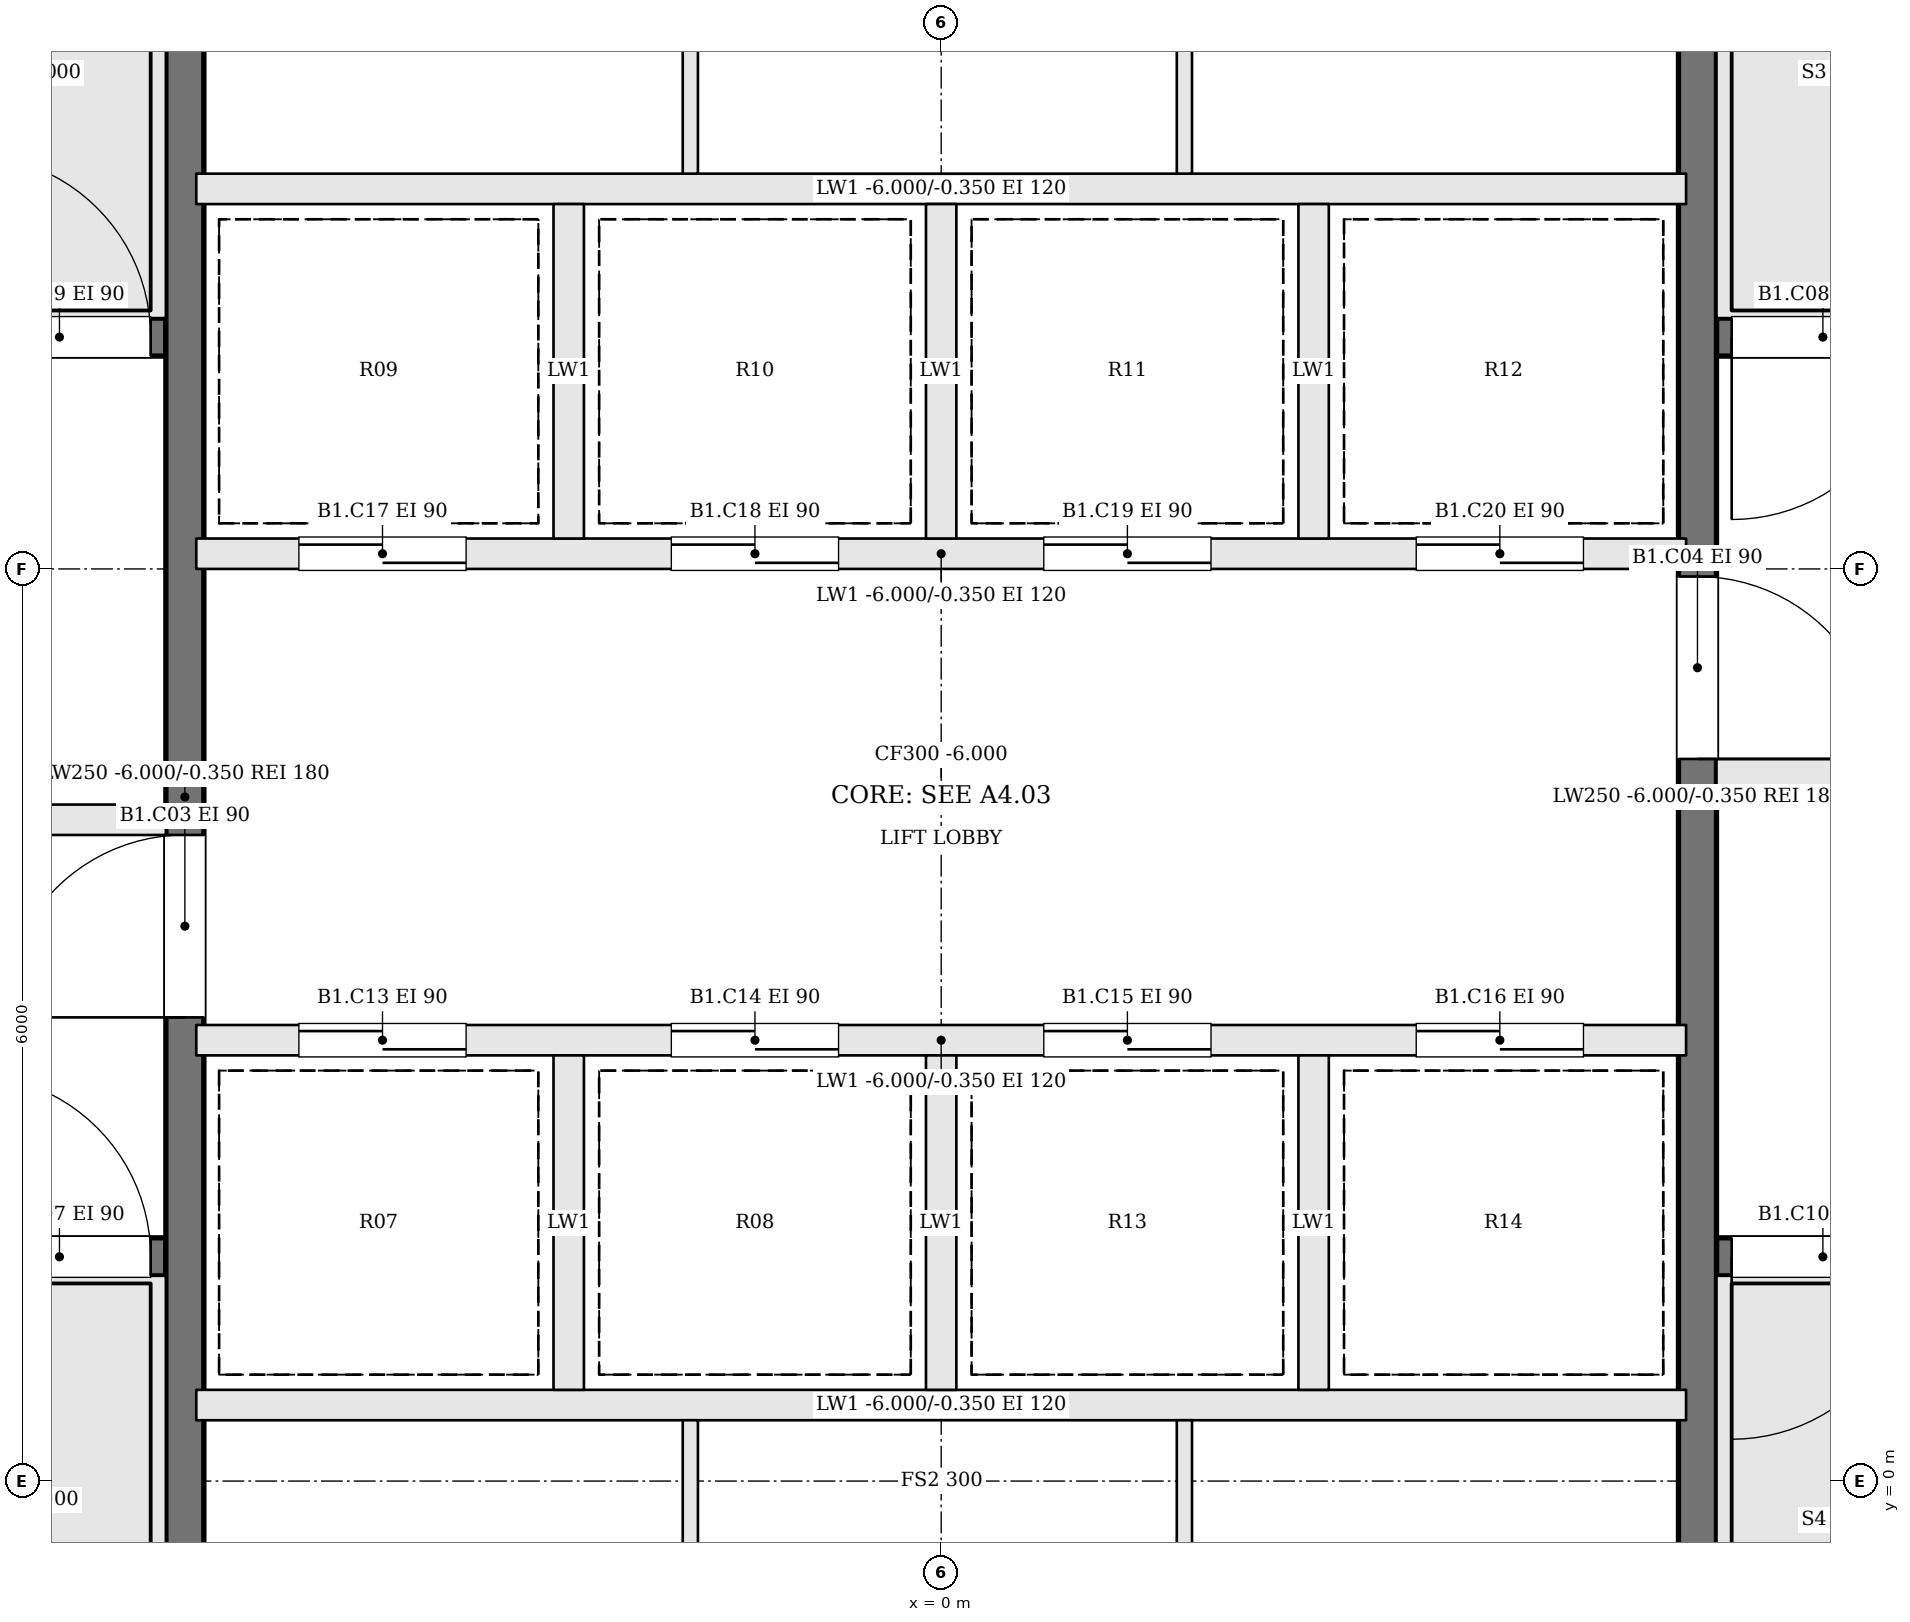
"""IFC4 building model, lengths in metres.
Left out: names, types, materials, properties, quantities, classifications, styles, units other than length and angle.
Written with IfcOpenShell. Run it as: python <this file> out.ifc"""

import sys

from ifc_helpers import new_model, si_unit, direction, frame, frame_2d, origin, place, context, subcontext, project, spatial, rectangle, extrude, element, fill, save


model = new_model("IFC4")
c1 = context("Model", 3, precision=1e-05, world=origin(), true_north=direction((0.0, 1.0)))
c2 = subcontext(c1, "Body", "Model", "MODEL_VIEW")
j1 = project(units=[si_unit("LENGTHUNIT", "METRE"), si_unit("PLANEANGLEUNIT", "RADIAN")], contexts=[c1])
p1 = place(None, origin())
s1 = spatial("IfcSite", under=j1, at=p1, CompositionType="ELEMENT")
p2 = place(p1, origin())
s2 = spatial("IfcBuilding", under=s1, at=p2, CompositionType="ELEMENT")
p3 = place(p2, frame((0.0, 0.0, -6.0)))
s3 = spatial("IfcBuildingStorey", under=s2, at=p3, CompositionType="ELEMENT", Elevation=-6.0)
p4 = place(p3, frame((-11.6, 1.475, 0.0), z_axis=(0.0, 0.0, 1.0), x_axis=(1.0, 0.0, 0.0)))
e1 = element("IfcWall", 1, at=p4, inside=s3, PredefinedType="SOLIDWALL", context=c2, shape_type="SweptSolid", body=[
    extrude(rectangle(XDim=6.5, YDim=0.25, at=frame_2d((3.25, 0.0))), origin(), (0.0, 0.0, 1.0), 5.65),
])
p5 = place(p4, frame((5.2, 0.0, 0.0)))
e2 = element("IfcOpeningElement", 2, at=p5, cuts=e1, PredefinedType="OPENING", context=c2, shape_type="SweptSolid", body=[
    extrude(rectangle(XDim=1.2, YDim=2.1, at=frame_2d((0.6, 1.05))), frame((0.0, 0.135, 0.0), z_axis=(0.0, -1.0, 0.0), x_axis=(1.0, 0.0, 0.0)), (0.0, 0.0, 1.0), 0.27),
])
p6 = place(p3, frame((11.6, 7.525, 0.0), z_axis=(0.0, 0.0, 1.0), x_axis=(-1.0, 0.0, 0.0)))
e3 = element("IfcWall", 3, at=p6, inside=s3, PredefinedType="SOLIDWALL", context=c2, shape_type="SweptSolid", body=[
    extrude(rectangle(XDim=6.5, YDim=0.25, at=frame_2d((3.25, 0.0))), origin(), (0.0, 0.0, 1.0), 5.65),
])
p7 = place(p6, frame((5.2, 0.0, 0.0)))
e4 = element("IfcOpeningElement", 4, at=p7, cuts=e3, PredefinedType="OPENING", context=c2, shape_type="SweptSolid", body=[
    extrude(rectangle(XDim=1.2, YDim=2.1, at=frame_2d((0.6, 1.05))), frame((0.0, 0.135, 0.0), z_axis=(0.0, -1.0, 0.0), x_axis=(1.0, 0.0, 0.0)), (0.0, 0.0, 1.0), 0.27),
])
p8 = place(p3, frame((-11.6, 4.35, 0.0), z_axis=(0.0, 0.0, 1.0), x_axis=(1.0, 0.0, 0.0)))
e5 = element("IfcWall", 5, at=p8, inside=s3, PredefinedType="SOLIDWALL", context=c2, shape_type="SweptSolid", body=[
    extrude(rectangle(XDim=6.5, YDim=0.2, at=frame_2d((3.25, 0.0))), origin(), (0.0, 0.0, 1.0), 5.65),
])
p9 = place(p8, frame((3.8, 0.0, 0.0)))
e6 = element("IfcOpeningElement", 6, at=p9, cuts=e5, PredefinedType="OPENING", context=c2, shape_type="SweptSolid", body=[
    extrude(rectangle(XDim=1.2, YDim=2.1, at=frame_2d((0.6, 1.05))), frame((0.0, 0.11, 0.0), z_axis=(0.0, -1.0, 0.0), x_axis=(1.0, 0.0, 0.0)), (0.0, 0.0, 1.0), 0.22),
])
p10 = place(p8, frame((0.5, 0.0, 0.0)))
e7 = element("IfcOpeningElement", 7, at=p10, cuts=e5, PredefinedType="OPENING", context=c2, shape_type="SweptSolid", body=[
    extrude(rectangle(XDim=1.2, YDim=2.1, at=frame_2d((0.6, 1.05))), frame((0.0, 0.11, 0.0), z_axis=(0.0, -1.0, 0.0), x_axis=(1.0, 0.0, 0.0)), (0.0, 0.0, 1.0), 0.22),
])
p11 = place(p3, frame((11.6, 4.65, 0.0), z_axis=(0.0, 0.0, 1.0), x_axis=(-1.0, 0.0, 0.0)))
e8 = element("IfcWall", 8, at=p11, inside=s3, PredefinedType="SOLIDWALL", context=c2, shape_type="SweptSolid", body=[
    extrude(rectangle(XDim=6.5, YDim=0.2, at=frame_2d((3.25, 0.0))), origin(), (0.0, 0.0, 1.0), 5.65),
])
p12 = place(p11, frame((3.8, 0.0, 0.0)))
e9 = element("IfcOpeningElement", 9, at=p12, cuts=e8, PredefinedType="OPENING", context=c2, shape_type="SweptSolid", body=[
    extrude(rectangle(XDim=1.2, YDim=2.1, at=frame_2d((0.6, 1.05))), frame((0.0, 0.11, 0.0), z_axis=(0.0, -1.0, 0.0), x_axis=(1.0, 0.0, 0.0)), (0.0, 0.0, 1.0), 0.22),
])
p13 = place(p11, frame((0.5, 0.0, 0.0)))
e10 = element("IfcOpeningElement", 10, at=p13, cuts=e8, PredefinedType="OPENING", context=c2, shape_type="SweptSolid", body=[
    extrude(rectangle(XDim=1.2, YDim=2.1, at=frame_2d((0.6, 1.05))), frame((0.0, 0.11, 0.0), z_axis=(0.0, -1.0, 0.0), x_axis=(1.0, 0.0, 0.0)), (0.0, 0.0, 1.0), 0.22),
])
p14 = place(p3, frame((-11.6, 7.525, 0.0), z_axis=(0.0, 0.0, 1.0), x_axis=(1.0, 0.0, 0.0)))
e11 = element("IfcWall", 11, at=p14, inside=s3, PredefinedType="SOLIDWALL", context=c2, shape_type="SweptSolid", body=[
    extrude(rectangle(XDim=6.5, YDim=0.25, at=frame_2d((3.25, 0.0))), origin(), (0.0, 0.0, 1.0), 5.65),
])
p15 = place(p14, frame((5.2, 0.0, 0.0)))
e12 = element("IfcOpeningElement", 12, at=p15, cuts=e11, PredefinedType="OPENING", context=c2, shape_type="SweptSolid", body=[
    extrude(rectangle(XDim=1.2, YDim=2.1, at=frame_2d((0.6, 1.05))), frame((0.0, 0.135, 0.0), z_axis=(0.0, -1.0, 0.0), x_axis=(1.0, 0.0, 0.0)), (0.0, 0.0, 1.0), 0.27),
])
p16 = place(p3, frame((11.6, 1.475, 0.0), z_axis=(0.0, 0.0, 1.0), x_axis=(-1.0, 0.0, 0.0)))
e13 = element("IfcWall", 13, at=p16, inside=s3, PredefinedType="SOLIDWALL", context=c2, shape_type="SweptSolid", body=[
    extrude(rectangle(XDim=6.5, YDim=0.25, at=frame_2d((3.25, 0.0))), origin(), (0.0, 0.0, 1.0), 5.65),
])
p17 = place(p16, frame((5.2, 0.0, 0.0)))
e14 = element("IfcOpeningElement", 14, at=p17, cuts=e13, PredefinedType="OPENING", context=c2, shape_type="SweptSolid", body=[
    extrude(rectangle(XDim=1.2, YDim=2.1, at=frame_2d((0.6, 1.05))), frame((0.0, 0.135, 0.0), z_axis=(0.0, -1.0, 0.0), x_axis=(1.0, 0.0, 0.0)), (0.0, 0.0, 1.0), 0.27),
])
p18 = place(p3, frame((-4.975, -1.6, 0.0), z_axis=(0.0, 0.0, 1.0), x_axis=(0.0, 1.0, 0.0)))
e15 = element("IfcWall", 15, at=p18, inside=s3, PredefinedType="SOLIDWALL", context=c2, shape_type="SweptSolid", body=[
    extrude(rectangle(XDim=12.2, YDim=0.25, at=frame_2d((6.1, 0.0))), origin(), (0.0, 0.0, 1.0), 5.65),
])
p19 = place(p18, frame((4.65, 0.0, 0.0)))
e16 = element("IfcOpeningElement", 16, at=p19, cuts=e15, PredefinedType="OPENING", context=c2, shape_type="SweptSolid", body=[
    extrude(rectangle(XDim=1.2, YDim=2.1, at=frame_2d((0.6, 1.05))), frame((0.0, 0.135, 0.0), z_axis=(0.0, -1.0, 0.0), x_axis=(1.0, 0.0, 0.0)), (0.0, 0.0, 1.0), 0.27),
])
p20 = place(p3, frame((4.975, 10.6, 0.0), z_axis=(0.0, 0.0, 1.0), x_axis=(0.0, -1.0, 0.0)))
e17 = element("IfcWall", 17, at=p20, inside=s3, PredefinedType="SOLIDWALL", context=c2, shape_type="SweptSolid", body=[
    extrude(rectangle(XDim=12.2, YDim=0.25, at=frame_2d((6.1, 0.0))), origin(), (0.0, 0.0, 1.0), 5.65),
])
p21 = place(p20, frame((4.65, 0.0, 0.0)))
e18 = element("IfcOpeningElement", 18, at=p21, cuts=e17, PredefinedType="OPENING", context=c2, shape_type="SweptSolid", body=[
    extrude(rectangle(XDim=1.2, YDim=2.1, at=frame_2d((0.6, 1.05))), frame((0.0, 0.135, 0.0), z_axis=(0.0, -1.0, 0.0), x_axis=(1.0, 0.0, 0.0)), (0.0, 0.0, 1.0), 0.27),
])
p22 = place(p3, frame((-4.9, 0.5, 0.0), z_axis=(0.0, 0.0, 1.0), x_axis=(1.0, 0.0, 0.0)))
e19 = element("IfcWall", 19, at=p22, inside=s3, PredefinedType="SOLIDWALL", context=c2, shape_type="SweptSolid", body=[
    extrude(rectangle(XDim=9.8, YDim=0.2, at=frame_2d((4.9, 0.0))), origin(), (0.0, 0.0, 1.0), 5.65),
])
p23 = place(p3, frame((-4.9, 2.9, 0.0), z_axis=(0.0, 0.0, 1.0), x_axis=(1.0, 0.0, 0.0)))
e20 = element("IfcWall", 20, at=p23, inside=s3, PredefinedType="SOLIDWALL", context=c2, shape_type="SweptSolid", body=[
    extrude(rectangle(XDim=9.8, YDim=0.2, at=frame_2d((4.9, 0.0))), origin(), (0.0, 0.0, 1.0), 5.65),
])
p24 = place(p23, frame((0.675, 0.0, 0.0)))
e21 = element("IfcOpeningElement", 21, at=p24, cuts=e20, PredefinedType="OPENING", context=c2, shape_type="SweptSolid", body=[
    extrude(rectangle(XDim=1.1, YDim=2.1, at=frame_2d((0.55, 1.05))), frame((0.0, 0.11, 0.0), z_axis=(0.0, -1.0, 0.0), x_axis=(1.0, 0.0, 0.0)), (0.0, 0.0, 1.0), 0.22),
])
p25 = place(p23, frame((3.125, 0.0, 0.0)))
e22 = element("IfcOpeningElement", 22, at=p25, cuts=e20, PredefinedType="OPENING", context=c2, shape_type="SweptSolid", body=[
    extrude(rectangle(XDim=1.1, YDim=2.1, at=frame_2d((0.55, 1.05))), frame((0.0, 0.11, 0.0), z_axis=(0.0, -1.0, 0.0), x_axis=(1.0, 0.0, 0.0)), (0.0, 0.0, 1.0), 0.22),
])
p26 = place(p23, frame((5.575, 0.0, 0.0)))
e23 = element("IfcOpeningElement", 23, at=p26, cuts=e20, PredefinedType="OPENING", context=c2, shape_type="SweptSolid", body=[
    extrude(rectangle(XDim=1.1, YDim=2.1, at=frame_2d((0.55, 1.05))), frame((0.0, 0.11, 0.0), z_axis=(0.0, -1.0, 0.0), x_axis=(1.0, 0.0, 0.0)), (0.0, 0.0, 1.0), 0.22),
])
p27 = place(p23, frame((8.025, 0.0, 0.0)))
e24 = element("IfcOpeningElement", 24, at=p27, cuts=e20, PredefinedType="OPENING", context=c2, shape_type="SweptSolid", body=[
    extrude(rectangle(XDim=1.1, YDim=2.1, at=frame_2d((0.55, 1.05))), frame((0.0, 0.11, 0.0), z_axis=(0.0, -1.0, 0.0), x_axis=(1.0, 0.0, 0.0)), (0.0, 0.0, 1.0), 0.22),
])
p28 = place(p3, frame((-4.9, 6.1, 0.0), z_axis=(0.0, 0.0, 1.0), x_axis=(1.0, 0.0, 0.0)))
e25 = element("IfcWall", 25, at=p28, inside=s3, PredefinedType="SOLIDWALL", context=c2, shape_type="SweptSolid", body=[
    extrude(rectangle(XDim=9.8, YDim=0.2, at=frame_2d((4.9, 0.0))), origin(), (0.0, 0.0, 1.0), 5.65),
])
p29 = place(p28, frame((0.675, 0.0, 0.0)))
e26 = element("IfcOpeningElement", 26, at=p29, cuts=e25, PredefinedType="OPENING", context=c2, shape_type="SweptSolid", body=[
    extrude(rectangle(XDim=1.1, YDim=2.1, at=frame_2d((0.55, 1.05))), frame((0.0, 0.11, 0.0), z_axis=(0.0, -1.0, 0.0), x_axis=(1.0, 0.0, 0.0)), (0.0, 0.0, 1.0), 0.22),
])
p30 = place(p28, frame((3.125, 0.0, 0.0)))
e27 = element("IfcOpeningElement", 27, at=p30, cuts=e25, PredefinedType="OPENING", context=c2, shape_type="SweptSolid", body=[
    extrude(rectangle(XDim=1.1, YDim=2.1, at=frame_2d((0.55, 1.05))), frame((0.0, 0.11, 0.0), z_axis=(0.0, -1.0, 0.0), x_axis=(1.0, 0.0, 0.0)), (0.0, 0.0, 1.0), 0.22),
])
p31 = place(p28, frame((5.575, 0.0, 0.0)))
e28 = element("IfcOpeningElement", 28, at=p31, cuts=e25, PredefinedType="OPENING", context=c2, shape_type="SweptSolid", body=[
    extrude(rectangle(XDim=1.1, YDim=2.1, at=frame_2d((0.55, 1.05))), frame((0.0, 0.11, 0.0), z_axis=(0.0, -1.0, 0.0), x_axis=(1.0, 0.0, 0.0)), (0.0, 0.0, 1.0), 0.22),
])
p32 = place(p28, frame((8.025, 0.0, 0.0)))
e29 = element("IfcOpeningElement", 29, at=p32, cuts=e25, PredefinedType="OPENING", context=c2, shape_type="SweptSolid", body=[
    extrude(rectangle(XDim=1.1, YDim=2.1, at=frame_2d((0.55, 1.05))), frame((0.0, 0.11, 0.0), z_axis=(0.0, -1.0, 0.0), x_axis=(1.0, 0.0, 0.0)), (0.0, 0.0, 1.0), 0.22),
])
p33 = place(p3, frame((-4.9, 8.5, 0.0), z_axis=(0.0, 0.0, 1.0), x_axis=(1.0, 0.0, 0.0)))
e30 = element("IfcWall", 30, at=p33, inside=s3, PredefinedType="SOLIDWALL", context=c2, shape_type="SweptSolid", body=[
    extrude(rectangle(XDim=9.8, YDim=0.2, at=frame_2d((4.9, 0.0))), origin(), (0.0, 0.0, 1.0), 5.65),
])
for number, where, z_axis, x_axis in (
    (31, (-2.45, 0.6, 0.0), (0.0, 0.0, 1.0), (0.0, 1.0, 0.0)),
    (32, (0.0, 0.6, 0.0), (0.0, 0.0, 1.0), (0.0, 1.0, 0.0)),
    (33, (2.45, 0.6, 0.0), (0.0, 0.0, 1.0), (0.0, 1.0, 0.0)),
    (34, (-2.45, 6.2, 0.0), (0.0, 0.0, 1.0), (0.0, 1.0, 0.0)),
    (35, (0.0, 6.2, 0.0), (0.0, 0.0, 1.0), (0.0, 1.0, 0.0)),
    (36, (2.45, 6.2, 0.0), (0.0, 0.0, 1.0), (0.0, 1.0, 0.0)),
):
    element("IfcWall", number, at=place(p3, frame(where, z_axis=z_axis, x_axis=x_axis)), inside=s3, PredefinedType="SOLIDWALL", context=c2, shape_type="SweptSolid", body=[
        extrude(rectangle(XDim=2.2, YDim=0.2, at=frame_2d((1.1, 0.0))), origin(), (0.0, 0.0, 1.0), 5.65),
    ])
for number, where, z_axis, x_axis in (
    (37, (-1.65, -1.6, 0.0), (0.0, 0.0, 1.0), (0.0, 1.0, 0.0)),
    (38, (1.6, -1.6, 0.0), (0.0, 0.0, 1.0), (0.0, 1.0, 0.0)),
    (39, (-1.65, 8.6, 0.0), (0.0, 0.0, 1.0), (0.0, 1.0, 0.0)),
    (40, (1.6, 8.6, 0.0), (0.0, 0.0, 1.0), (0.0, 1.0, 0.0)),
):
    element("IfcWall", number, at=place(p3, frame(where, z_axis=z_axis, x_axis=x_axis)), inside=s3, PredefinedType="PARTITIONING", context=c2, shape_type="SweptSolid", body=[
        extrude(rectangle(XDim=2.0, YDim=0.1, at=frame_2d((1.0, 0.0))), origin(), (0.0, 0.0, 1.0), 5.65),
    ])
p34 = place(p19, origin())
e41 = element("IfcDoor", 41, at=p34, inside=s3, OperationType="SINGLE_SWING_LEFT", PredefinedType="DOOR", context=c2, shape_type="SweptSolid", body=[
    extrude(rectangle(XDim=1.2, YDim=2.1, at=frame_2d((0.6, 1.05))), frame((0.0, 0.025, 0.0), z_axis=(0.0, -1.0, 0.0), x_axis=(1.0, 0.0, 0.0)), (0.0, 0.0, 1.0), 0.05),
])
fill(e16, e41)
p35 = place(p21, origin())
e42 = element("IfcDoor", 42, at=p35, inside=s3, OperationType="SINGLE_SWING_RIGHT", PredefinedType="DOOR", context=c2, shape_type="SweptSolid", body=[
    extrude(rectangle(XDim=1.2, YDim=2.1, at=frame_2d((0.6, 1.05))), frame((0.0, 0.025, 0.0), z_axis=(0.0, -1.0, 0.0), x_axis=(1.0, 0.0, 0.0)), (0.0, 0.0, 1.0), 0.05),
])
fill(e18, e42)
p36 = place(p5, origin())
e43 = element("IfcDoor", 43, at=p36, inside=s3, OperationType="SINGLE_SWING_LEFT", PredefinedType="DOOR", context=c2, shape_type="SweptSolid", body=[
    extrude(rectangle(XDim=1.2, YDim=2.1, at=frame_2d((0.6, 1.05))), frame((0.0, 0.025, 0.0), z_axis=(0.0, -1.0, 0.0), x_axis=(1.0, 0.0, 0.0)), (0.0, 0.0, 1.0), 0.05),
])
fill(e2, e43)
p37 = place(p7, origin())
e44 = element("IfcDoor", 44, at=p37, inside=s3, OperationType="SINGLE_SWING_RIGHT", PredefinedType="DOOR", context=c2, shape_type="SweptSolid", body=[
    extrude(rectangle(XDim=1.2, YDim=2.1, at=frame_2d((0.6, 1.05))), frame((0.0, 0.025, 0.0), z_axis=(0.0, -1.0, 0.0), x_axis=(1.0, 0.0, 0.0)), (0.0, 0.0, 1.0), 0.05),
])
fill(e4, e44)
p38 = place(p15, origin())
e45 = element("IfcDoor", 45, at=p38, inside=s3, OperationType="SINGLE_SWING_LEFT", PredefinedType="DOOR", context=c2, shape_type="SweptSolid", body=[
    extrude(rectangle(XDim=1.2, YDim=2.1, at=frame_2d((0.6, 1.05))), frame((0.0, 0.025, 0.0), z_axis=(0.0, -1.0, 0.0), x_axis=(1.0, 0.0, 0.0)), (0.0, 0.0, 1.0), 0.05),
])
fill(e12, e45)
p39 = place(p17, origin())
e46 = element("IfcDoor", 46, at=p39, inside=s3, OperationType="SINGLE_SWING_RIGHT", PredefinedType="DOOR", context=c2, shape_type="SweptSolid", body=[
    extrude(rectangle(XDim=1.2, YDim=2.1, at=frame_2d((0.6, 1.05))), frame((0.0, 0.025, 0.0), z_axis=(0.0, -1.0, 0.0), x_axis=(1.0, 0.0, 0.0)), (0.0, 0.0, 1.0), 0.05),
])
fill(e14, e46)
p40 = place(p24, origin())
e47 = element("IfcDoor", 47, at=p40, inside=s3, OperationType="SLIDING_TO_RIGHT", PredefinedType="DOOR", context=c2, shape_type="SweptSolid", body=[
    extrude(rectangle(XDim=1.1, YDim=2.1, at=frame_2d((0.55, 1.05))), frame((0.0, 0.025, 0.0), z_axis=(0.0, -1.0, 0.0), x_axis=(1.0, 0.0, 0.0)), (0.0, 0.0, 1.0), 0.05),
])
fill(e21, e47)
p41 = place(p25, origin())
e48 = element("IfcDoor", 48, at=p41, inside=s3, OperationType="SLIDING_TO_LEFT", PredefinedType="DOOR", context=c2, shape_type="SweptSolid", body=[
    extrude(rectangle(XDim=1.1, YDim=2.1, at=frame_2d((0.55, 1.05))), frame((0.0, 0.025, 0.0), z_axis=(0.0, -1.0, 0.0), x_axis=(1.0, 0.0, 0.0)), (0.0, 0.0, 1.0), 0.05),
])
fill(e22, e48)
p42 = place(p26, origin())
e49 = element("IfcDoor", 49, at=p42, inside=s3, OperationType="SLIDING_TO_LEFT", PredefinedType="DOOR", context=c2, shape_type="SweptSolid", body=[
    extrude(rectangle(XDim=1.1, YDim=2.1, at=frame_2d((0.55, 1.05))), frame((0.0, 0.025, 0.0), z_axis=(0.0, -1.0, 0.0), x_axis=(1.0, 0.0, 0.0)), (0.0, 0.0, 1.0), 0.05),
])
fill(e23, e49)
p43 = place(p27, origin())
e50 = element("IfcDoor", 50, at=p43, inside=s3, OperationType="SLIDING_TO_RIGHT", PredefinedType="DOOR", context=c2, shape_type="SweptSolid", body=[
    extrude(rectangle(XDim=1.1, YDim=2.1, at=frame_2d((0.55, 1.05))), frame((0.0, 0.025, 0.0), z_axis=(0.0, -1.0, 0.0), x_axis=(1.0, 0.0, 0.0)), (0.0, 0.0, 1.0), 0.05),
])
fill(e24, e50)
p44 = place(p29, origin())
e51 = element("IfcDoor", 51, at=p44, inside=s3, OperationType="SLIDING_TO_RIGHT", PredefinedType="DOOR", context=c2, shape_type="SweptSolid", body=[
    extrude(rectangle(XDim=1.1, YDim=2.1, at=frame_2d((0.55, 1.05))), frame((0.0, 0.025, 0.0), z_axis=(0.0, -1.0, 0.0), x_axis=(1.0, 0.0, 0.0)), (0.0, 0.0, 1.0), 0.05),
])
fill(e26, e51)
p45 = place(p30, origin())
e52 = element("IfcDoor", 52, at=p45, inside=s3, OperationType="SLIDING_TO_LEFT", PredefinedType="DOOR", context=c2, shape_type="SweptSolid", body=[
    extrude(rectangle(XDim=1.1, YDim=2.1, at=frame_2d((0.55, 1.05))), frame((0.0, 0.025, 0.0), z_axis=(0.0, -1.0, 0.0), x_axis=(1.0, 0.0, 0.0)), (0.0, 0.0, 1.0), 0.05),
])
fill(e27, e52)
p46 = place(p31, origin())
e53 = element("IfcDoor", 53, at=p46, inside=s3, OperationType="SLIDING_TO_RIGHT", PredefinedType="DOOR", context=c2, shape_type="SweptSolid", body=[
    extrude(rectangle(XDim=1.1, YDim=2.1, at=frame_2d((0.55, 1.05))), frame((0.0, 0.025, 0.0), z_axis=(0.0, -1.0, 0.0), x_axis=(1.0, 0.0, 0.0)), (0.0, 0.0, 1.0), 0.05),
])
fill(e28, e53)
p47 = place(p32, origin())
e54 = element("IfcDoor", 54, at=p47, inside=s3, OperationType="SLIDING_TO_LEFT", PredefinedType="DOOR", context=c2, shape_type="SweptSolid", body=[
    extrude(rectangle(XDim=1.1, YDim=2.1, at=frame_2d((0.55, 1.05))), frame((0.0, 0.025, 0.0), z_axis=(0.0, -1.0, 0.0), x_axis=(1.0, 0.0, 0.0)), (0.0, 0.0, 1.0), 0.05),
])
fill(e29, e54)
save(model, sys.argv[1])
